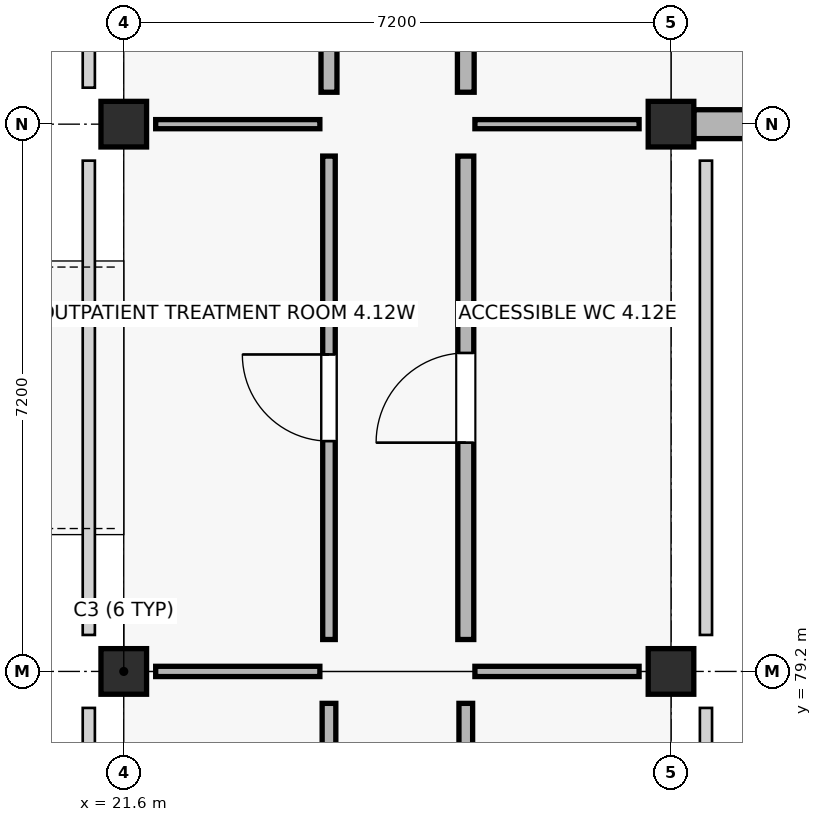
"""IFC4 building model, lengths in metres.
Left out: names, types, materials, properties, quantities, classifications, styles, units other than length and angle.
Written with IfcOpenShell. Run it as: python <this file> out.ifc"""

import sys

from ifc_helpers import new_model, si_unit, direction, frame, frame_2d, origin, origin_2d, place, context, subcontext, project, spatial, rectangle, extrude, element, fill, save


model = new_model("IFC4")
c1 = context("Model", 3, precision=1e-05, world=origin(), true_north=direction((0.0, 1.0)))
c2 = subcontext(c1, "Body", "Model", "MODEL_VIEW")
j1 = project(units=[si_unit("LENGTHUNIT", "METRE"), si_unit("PLANEANGLEUNIT", "RADIAN")], contexts=[c1])
p1 = place(None, origin())
s1 = spatial("IfcSite", under=j1, at=p1, CompositionType="ELEMENT")
p2 = place(p1, origin())
s2 = spatial("IfcBuilding", under=s1, at=p2, CompositionType="ELEMENT")
p3 = place(p2, frame((0.0, 0.0, 4.5)))
s3 = spatial("IfcBuildingStorey", under=s2, at=p3, CompositionType="ELEMENT", Elevation=4.5)
for number, where, z_axis, x_axis in (
    (1, (21.6, 79.2, 0.0), (0.0, 0.0, 1.0), (1.0, 0.0, 0.0)),
    (2, (21.6, 86.4, 0.0), (0.0, 0.0, 1.0), (1.0, 0.0, 0.0)),
    (3, (28.8, 79.2, 0.0), (0.0, 0.0, 1.0), (1.0, 0.0, 0.0)),
    (4, (28.8, 86.4, 0.0), (0.0, 0.0, 1.0), (1.0, 0.0, 0.0)),
):
    element("IfcColumn", number, at=place(p3, frame(where, z_axis=z_axis, x_axis=x_axis)), inside=s3, PredefinedType="COLUMN", context=c2, shape_type="SweptSolid", body=[
        extrude(rectangle(XDim=0.6, YDim=0.6, at=origin_2d()), origin(), (0.0, 0.0, 1.0), 4.5),
    ])
p4 = place(p3, frame((29.1, 86.4, 0.0), z_axis=(0.0, 0.0, 1.0), x_axis=(1.0, 0.0, 0.0)))
e5 = element("IfcWall", 5, at=p4, inside=s3, PredefinedType="SOLIDWALL", context=c2, shape_type="SweptSolid", body=[
    extrude(rectangle(XDim=6.625, YDim=0.38, at=frame_2d((3.312, 0.0))), origin(), (0.0, 0.0, 1.0), 3.47),
])
p5 = place(p4, frame((1.075, 0.0, 0.9)))
e6 = element("IfcOpeningElement", 6, at=p5, cuts=e5, PredefinedType="OPENING", context=c2, shape_type="SweptSolid", body=[
    extrude(rectangle(XDim=1.35, YDim=1.25, at=frame_2d((0.675, 0.625))), frame((0.0, 0.2, 0.0), z_axis=(0.0, -1.0, 0.0), x_axis=(1.0, 0.0, 0.0)), (0.0, 0.0, 1.0), 0.4),
])
p6 = place(p4, frame((4.2, 0.0, 0.9)))
e7 = element("IfcOpeningElement", 7, at=p6, cuts=e5, PredefinedType="OPENING", context=c2, shape_type="SweptSolid", body=[
    extrude(rectangle(XDim=1.35, YDim=1.25, at=frame_2d((0.675, 0.625))), frame((0.0, 0.2, 0.0), z_axis=(0.0, -1.0, 0.0), x_axis=(1.0, 0.0, 0.0)), (0.0, 0.0, 1.0), 0.4),
])
p7 = place(p3, frame((24.3, 72.42, 0.0), z_axis=(0.0, 0.0, 1.0), x_axis=(0.0, 1.0, 0.0)))
e8 = element("IfcWall", 8, at=p7, inside=s3, PredefinedType="PARTITIONING", context=c2, shape_type="SweptSolid", body=[
    extrude(rectangle(XDim=6.36, YDim=0.18, at=frame_2d((3.18, 0.0))), origin(), (0.0, 0.0, 1.0), 3.36),
])
p8 = place(p7, frame((2.65, 0.0, 0.0)))
e9 = element("IfcOpeningElement", 9, at=p8, cuts=e8, PredefinedType="OPENING", context=c2, shape_type="SweptSolid", body=[
    extrude(rectangle(XDim=1.06, YDim=2.04, at=frame_2d((0.53, 1.02))), frame((0.0, 0.1, 0.0), z_axis=(0.0, -1.0, 0.0), x_axis=(1.0, 0.0, 0.0)), (0.0, 0.0, 1.0), 0.2),
])
p9 = place(p3, frame((22.02, 79.2, 0.0), z_axis=(0.0, 0.0, 1.0), x_axis=(1.0, 0.0, 0.0)))
e10 = element("IfcWall", 10, at=p9, inside=s3, PredefinedType="PARTITIONING", context=c2, shape_type="SweptSolid", body=[
    extrude(rectangle(XDim=2.16, YDim=0.135, at=frame_2d((1.08, 0.0))), origin(), (0.0, 0.0, 1.0), 3.36),
])
p10 = place(p3, frame((26.1, 72.42, 0.0), z_axis=(0.0, 0.0, 1.0), x_axis=(0.0, 1.0, 0.0)))
e11 = element("IfcWall", 11, at=p10, inside=s3, PredefinedType="PARTITIONING", context=c2, shape_type="SweptSolid", body=[
    extrude(rectangle(XDim=6.36, YDim=0.18, at=frame_2d((3.18, 0.0))), origin(), (0.0, 0.0, 1.0), 3.36),
])
p11 = place(p10, frame((2.63, 0.0, 0.0)))
e12 = element("IfcOpeningElement", 12, at=p11, cuts=e11, PredefinedType="OPENING", context=c2, shape_type="SweptSolid", body=[
    extrude(rectangle(XDim=1.1, YDim=2.04, at=frame_2d((0.55, 1.02))), frame((0.0, 0.1, 0.0), z_axis=(0.0, -1.0, 0.0), x_axis=(1.0, 0.0, 0.0)), (0.0, 0.0, 1.0), 0.2),
])
p12 = place(p3, frame((26.22, 79.2, 0.0), z_axis=(0.0, 0.0, 1.0), x_axis=(1.0, 0.0, 0.0)))
e13 = element("IfcWall", 13, at=p12, inside=s3, PredefinedType="PARTITIONING", context=c2, shape_type="SweptSolid", body=[
    extrude(rectangle(XDim=2.16, YDim=0.135, at=frame_2d((1.08, 0.0))), origin(), (0.0, 0.0, 1.0), 3.36),
])
p13 = place(p3, frame((24.3, 79.62, 0.0), z_axis=(0.0, 0.0, 1.0), x_axis=(0.0, 1.0, 0.0)))
e14 = element("IfcWall", 14, at=p13, inside=s3, PredefinedType="PARTITIONING", context=c2, shape_type="SweptSolid", body=[
    extrude(rectangle(XDim=6.36, YDim=0.165, at=frame_2d((3.18, 0.0))), origin(), (0.0, 0.0, 1.0), 3.36),
])
p14 = place(p13, frame((2.61, 0.0, 0.0)))
e15 = element("IfcOpeningElement", 15, at=p14, cuts=e14, PredefinedType="OPENING", context=c2, shape_type="SweptSolid", body=[
    extrude(rectangle(XDim=1.14, YDim=2.04, at=frame_2d((0.57, 1.02))), frame((0.0, 0.093, 0.0), z_axis=(0.0, -1.0, 0.0), x_axis=(1.0, 0.0, 0.0)), (0.0, 0.0, 1.0), 0.185),
])
p15 = place(p3, frame((22.02, 86.4, 0.0), z_axis=(0.0, 0.0, 1.0), x_axis=(1.0, 0.0, 0.0)))
e16 = element("IfcWall", 16, at=p15, inside=s3, PredefinedType="PARTITIONING", context=c2, shape_type="SweptSolid", body=[
    extrude(rectangle(XDim=2.16, YDim=0.12, at=frame_2d((1.08, 0.0))), origin(), (0.0, 0.0, 1.0), 3.36),
])
p16 = place(p3, frame((26.1, 79.62, 0.0), z_axis=(0.0, 0.0, 1.0), x_axis=(0.0, 1.0, 0.0)))
e17 = element("IfcWall", 17, at=p16, inside=s3, PredefinedType="PLUMBINGWALL", context=c2, shape_type="SweptSolid", body=[
    extrude(rectangle(XDim=6.36, YDim=0.21, at=frame_2d((3.18, 0.0))), origin(), (0.0, 0.0, 1.0), 3.36),
])
p17 = place(p16, frame((2.59, 0.0, 0.0)))
e18 = element("IfcOpeningElement", 18, at=p17, cuts=e17, PredefinedType="OPENING", context=c2, shape_type="SweptSolid", body=[
    extrude(rectangle(XDim=1.18, YDim=2.04, at=frame_2d((0.59, 1.02))), frame((0.0, 0.115, 0.0), z_axis=(0.0, -1.0, 0.0), x_axis=(1.0, 0.0, 0.0)), (0.0, 0.0, 1.0), 0.23),
])
p18 = place(p3, frame((26.22, 86.4, 0.0), z_axis=(0.0, 0.0, 1.0), x_axis=(1.0, 0.0, 0.0)))
e19 = element("IfcWall", 19, at=p18, inside=s3, PredefinedType="PARTITIONING", context=c2, shape_type="SweptSolid", body=[
    extrude(rectangle(XDim=2.16, YDim=0.12, at=frame_2d((1.08, 0.0))), origin(), (0.0, 0.0, 1.0), 3.36),
])
p19 = place(p3, frame((24.3, 86.82, 0.0), z_axis=(0.0, 0.0, 1.0), x_axis=(0.0, 1.0, 0.0)))
e20 = element("IfcWall", 20, at=p19, inside=s3, PredefinedType="PLUMBINGWALL", context=c2, shape_type="SweptSolid", body=[
    extrude(rectangle(XDim=6.36, YDim=0.21, at=frame_2d((3.18, 0.0))), origin(), (0.0, 0.0, 1.0), 3.36),
])
p20 = place(p19, frame((2.57, 0.0, 0.0)))
e21 = element("IfcOpeningElement", 21, at=p20, cuts=e20, PredefinedType="OPENING", context=c2, shape_type="SweptSolid", body=[
    extrude(rectangle(XDim=1.22, YDim=2.04, at=frame_2d((0.61, 1.02))), frame((0.0, 0.115, 0.0), z_axis=(0.0, -1.0, 0.0), x_axis=(1.0, 0.0, 0.0)), (0.0, 0.0, 1.0), 0.23),
])
p21 = place(p3, frame((26.1, 86.82, 0.0), z_axis=(0.0, 0.0, 1.0), x_axis=(0.0, 1.0, 0.0)))
e22 = element("IfcWall", 22, at=p21, inside=s3, PredefinedType="SOLIDWALL", context=c2, shape_type="SweptSolid", body=[
    extrude(rectangle(XDim=6.36, YDim=0.22, at=frame_2d((3.18, 0.0))), origin(), (0.0, 0.0, 1.0), 3.36),
])
p22 = place(p21, frame((2.55, 0.0, 0.0)))
e23 = element("IfcOpeningElement", 23, at=p22, cuts=e22, PredefinedType="OPENING", context=c2, shape_type="SweptSolid", body=[
    extrude(rectangle(XDim=1.26, YDim=2.04, at=frame_2d((0.63, 1.02))), frame((0.0, 0.12, 0.0), z_axis=(0.0, -1.0, 0.0), x_axis=(1.0, 0.0, 0.0)), (0.0, 0.0, 1.0), 0.24),
])
p23 = place(p14, origin())
e24 = element("IfcDoor", 24, at=p23, inside=s3, OperationType="SINGLE_SWING_RIGHT", PredefinedType="DOOR", context=c2, shape_type="SweptSolid", body=[
    extrude(rectangle(XDim=1.14, YDim=2.04, at=frame_2d((0.57, 1.02))), frame((0.0, 0.025, 0.0), z_axis=(0.0, -1.0, 0.0), x_axis=(1.0, 0.0, 0.0)), (0.0, 0.0, 1.0), 0.05),
])
fill(e15, e24)
p24 = place(p17, origin())
e25 = element("IfcDoor", 25, at=p24, inside=s3, OperationType="SINGLE_SWING_LEFT", PredefinedType="DOOR", context=c2, shape_type="SweptSolid", body=[
    extrude(rectangle(XDim=1.18, YDim=2.04, at=frame_2d((0.59, 1.02))), frame((0.0, 0.025, 0.0), z_axis=(0.0, -1.0, 0.0), x_axis=(1.0, 0.0, 0.0)), (0.0, 0.0, 1.0), 0.05),
])
fill(e18, e25)
save(model, sys.argv[1])
